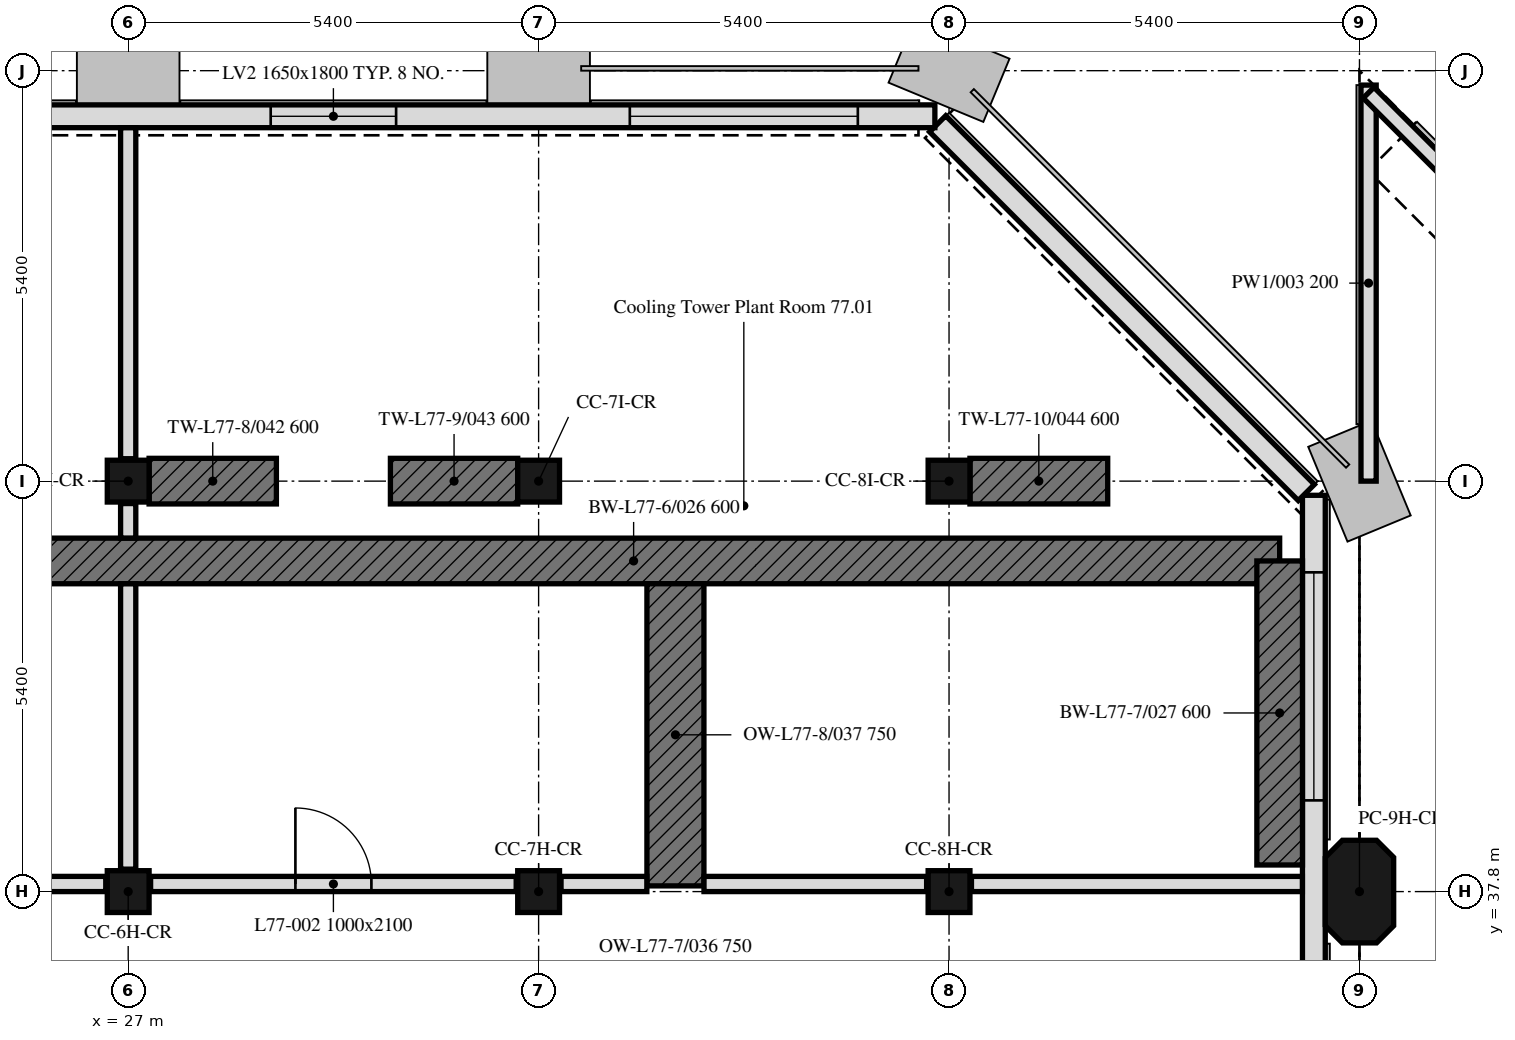
"""IFC4 building model, lengths in metres.
Left out: names, types, materials, properties, quantities, classifications, styles, units other than length and angle.
Written with IfcOpenShell. Run it as: python <this file> out.ifc"""

import sys

from ifc_helpers import new_model, si_unit, direction, frame, frame_2d, origin, origin_2d, place, context, subcontext, project, spatial, polyline, rectangle, outline, extrude, element, fill, save


model = new_model("IFC4")
c1 = context("Model", 3, precision=1e-05, world=origin(), true_north=direction((0.0, 1.0)))
c2 = subcontext(c1, "Body", "Model", "MODEL_VIEW")
j1 = project(units=[si_unit("LENGTHUNIT", "METRE"), si_unit("PLANEANGLEUNIT", "RADIAN")], contexts=[c1])
p1 = place(None, origin())
s1 = spatial("IfcSite", under=j1, at=p1, CompositionType="ELEMENT")
p2 = place(p1, origin())
s2 = spatial("IfcBuilding", under=s1, at=p2, CompositionType="ELEMENT")
p3 = place(p2, frame((0.0, 0.0, 308.2)))
s3 = spatial("IfcBuildingStorey", under=s2, at=p3, CompositionType="ELEMENT", Elevation=308.2)
for number, where, z_axis, x_axis in (
    (1, (27.0, 37.8, 0.0), (0.0, 0.0, 1.0), (1.0, 0.0, 0.0)),
    (2, (32.4, 37.8, 0.0), (0.0, 0.0, 1.0), (1.0, 0.0, 0.0)),
    (3, (37.8, 37.8, 0.0), (0.0, 0.0, 1.0), (1.0, 0.0, 0.0)),
):
    element("IfcColumn", number, at=place(p3, frame(where, z_axis=z_axis, x_axis=x_axis)), inside=s3, PredefinedType="COLUMN", context=c2, shape_type="SweptSolid", body=[
        extrude(rectangle(XDim=0.55, YDim=0.55, at=origin_2d()), origin(), (0.0, 0.0, 1.0), 4.2),
    ])
p4 = place(p3, frame((43.2, 37.8, 0.0), z_axis=(0.0, 0.0, 1.0), x_axis=(0.0, 1.0, 0.0)))
e4 = element("IfcColumn", 4, at=p4, inside=s3, PredefinedType="COLUMN", context=c2, shape_type="SweptSolid", body=[
    extrude(outline(polyline([(-0.45, -0.45), (0.45, -0.45), (0.675, -0.225), (0.675, 0.225), (0.45, 0.45), (-0.45, 0.45), (-0.675, 0.225), (-0.675, -0.225), (-0.45, -0.45)])), origin(), (0.0, 0.0, 1.0), 4.2),
])
for number, where, z_axis, x_axis in (
    (5, (27.0, 43.2, 0.0), (0.0, 0.0, 1.0), (1.0, 0.0, 0.0)),
    (6, (32.4, 43.2, 0.0), (0.0, 0.0, 1.0), (1.0, 0.0, 0.0)),
    (7, (37.8, 43.2, 0.0), (0.0, 0.0, 1.0), (1.0, 0.0, 0.0)),
):
    element("IfcColumn", number, at=place(p3, frame(where, z_axis=z_axis, x_axis=x_axis)), inside=s3, PredefinedType="COLUMN", context=c2, shape_type="SweptSolid", body=[
        extrude(rectangle(XDim=0.55, YDim=0.55, at=origin_2d()), origin(), (0.0, 0.0, 1.0), 4.2),
    ])
p5 = place(p3, frame((25.15, 42.15, 0.0), z_axis=(0.0, 0.0, 1.0), x_axis=(1.0, 0.0, 0.0)))
e8 = element("IfcWall", 8, at=p5, inside=s3, PredefinedType="SHEAR", context=c2, shape_type="SweptSolid", body=[
    extrude(rectangle(XDim=17.0, YDim=0.6, at=frame_2d((8.5, 0.0))), origin(), (0.0, 0.0, 1.0), 4.2),
])
p6 = place(p3, frame((42.15, 42.15, 0.0), z_axis=(0.0, 0.0, 1.0), x_axis=(0.0, -1.0, 0.0)))
e9 = element("IfcWall", 9, at=p6, inside=s3, PredefinedType="SHEAR", context=c2, shape_type="SweptSolid", body=[
    extrude(rectangle(XDim=4.0, YDim=0.6, at=frame_2d((2.0, 0.0))), origin(), (0.0, 0.0, 1.0), 4.2),
])
p7 = place(p3, frame((34.2, 37.875, 0.0), z_axis=(0.0, 0.0, 1.0), x_axis=(0.0, 1.0, 0.0)))
e10 = element("IfcWall", 10, at=p7, inside=s3, PredefinedType="SHEAR", context=c2, shape_type="SweptSolid", body=[
    extrude(rectangle(XDim=3.975, YDim=0.75, at=frame_2d((1.988, 0.0))), origin(), (0.0, 0.0, 1.0), 4.2),
])
for number, where, z_axis, x_axis in (
    (11, (27.275, 43.2, 0.0), (0.0, 0.0, 1.0), (1.0, 0.0, 0.0)),
    (12, (30.45, 43.2, 0.0), (0.0, 0.0, 1.0), (1.0, 0.0, 0.0)),
):
    element("IfcWall", number, at=place(p3, frame(where, z_axis=z_axis, x_axis=x_axis)), inside=s3, PredefinedType="SHEAR", context=c2, shape_type="SweptSolid", body=[
        extrude(rectangle(XDim=1.675, YDim=0.6, at=frame_2d((0.837, 0.0))), origin(), (0.0, 0.0, 1.0), 4.2),
    ])
p8 = place(p3, frame((38.075, 43.2, 0.0), z_axis=(0.0, 0.0, 1.0), x_axis=(1.0, 0.0, 0.0)))
e13 = element("IfcWall", 13, at=p8, inside=s3, PredefinedType="SHEAR", context=c2, shape_type="SweptSolid", body=[
    extrude(rectangle(XDim=1.812, YDim=0.6, at=frame_2d((0.906, 0.0))), origin(), (0.0, 0.0, 1.0), 4.2),
])
p9 = place(p3, frame((42.6, 32.4, 0.0), z_axis=(0.0, 0.0, 1.0), x_axis=(0.0, 1.0, 0.0)))
e14 = element("IfcWall", 14, at=p9, inside=s3, PredefinedType="SOLIDWALL", context=c2, shape_type="SweptSolid", body=[
    extrude(outline(polyline([(0.0, 0.0), (10.614, 0.0), (10.614, 4.2), (10.024, 4.2), (9.434, 4.2), (8.845, 4.2), (8.255, 4.2), (7.665, 4.2), (7.076, 4.2), (6.486, 4.2), (5.896, 4.2), (5.307, 4.2), (4.717, 4.2), (4.127, 4.2), (3.538, 4.2), (2.948, 4.2), (2.359, 4.2), (1.769, 4.2), (1.179, 4.2), (0.59, 4.2), (0.0, 4.2), (0.0, 0.0)])), frame((0.0, 0.15, 0.0), z_axis=(0.0, -1.0, 0.0), x_axis=(1.0, 0.0, 0.0)), (0.0, 0.0, 1.0), 0.3),
])
p10 = place(p9, frame((1.2, 0.0, 0.6)))
e15 = element("IfcOpeningElement", 15, at=p10, cuts=e14, PredefinedType="OPENING", context=c2, shape_type="SweptSolid", body=[
    extrude(rectangle(XDim=3.0, YDim=1.8, at=frame_2d((1.5, 0.9))), frame((0.0, 0.16, 0.0), z_axis=(0.0, -1.0, 0.0), x_axis=(1.0, 0.0, 0.0)), (0.0, 0.0, 1.0), 0.32),
])
p11 = place(p9, frame((6.6, 0.0, 0.6)))
e16 = element("IfcOpeningElement", 16, at=p11, cuts=e14, PredefinedType="OPENING", context=c2, shape_type="SweptSolid", body=[
    extrude(rectangle(XDim=3.0, YDim=1.8, at=frame_2d((1.5, 0.9))), frame((0.0, 0.16, 0.0), z_axis=(0.0, -1.0, 0.0), x_axis=(1.0, 0.0, 0.0)), (0.0, 0.0, 1.0), 0.32),
])
p12 = place(p3, frame((42.501, 43.051, 0.0), z_axis=(0.0, 0.0, 1.0), x_axis=(-0.707106781187, 0.707106781187, 0.0)))
e17 = element("IfcWall", 17, at=p12, inside=s3, PredefinedType="SOLIDWALL", context=c2, shape_type="SweptSolid", body=[
    extrude(outline(polyline([(0.0, 0.0), (6.86, 0.0), (6.86, 4.2), (6.288, 4.2), (5.716, 4.2), (5.145, 4.2), (4.573, 4.2), (4.001, 4.2), (3.43, 4.2), (2.858, 4.2), (2.287, 4.2), (1.715, 4.2), (1.143, 4.2), (0.572, 4.2), (0.0, 4.2), (0.0, 0.0)])), frame((0.0, 0.15, 0.0), z_axis=(0.0, -1.0, 0.0), x_axis=(1.0, 0.0, 0.0)), (0.0, 0.0, 1.0), 0.3),
])
p13 = place(p3, frame((37.614, 48.0, 0.0), z_axis=(0.0, 0.0, 1.0), x_axis=(-1.0, 0.0, 0.0)))
e18 = element("IfcWall", 18, at=p13, inside=s3, PredefinedType="SOLIDWALL", context=c2, shape_type="SweptSolid", body=[
    extrude(outline(polyline([(0.0, 0.0), (32.027, 0.0), (32.027, 4.2), (31.434, 4.2), (30.841, 4.2), (30.248, 4.2), (29.655, 4.2), (29.062, 4.2), (28.469, 4.2), (27.875, 4.2), (27.282, 4.2), (26.689, 4.2), (26.096, 4.2), (25.503, 4.2), (24.91, 4.2), (24.317, 4.2), (23.724, 4.2), (23.131, 4.2), (22.538, 4.2), (21.945, 4.2), (21.352, 4.2), (20.758, 4.2), (20.165, 4.2), (19.572, 4.2), (18.979, 4.2), (18.386, 4.2), (17.793, 4.2), (17.2, 4.2), (16.607, 4.2), (16.014, 4.2), (15.42, 4.2), (14.827, 4.2), (14.234, 4.2), (13.641, 4.2), (13.048, 4.2), (12.455, 4.2), (11.862, 4.2), (11.269, 4.2), (10.676, 4.2), (10.083, 4.2), (9.49, 4.2), (8.896, 4.2), (8.303, 4.2), (7.71, 4.2), (7.117, 4.2), (6.524, 4.2), (5.931, 4.2), (5.338, 4.2), (4.745, 4.2), (4.152, 4.2), (3.559, 4.2), (2.966, 4.2), (2.372, 4.2), (1.779, 4.2), (1.186, 4.2), (0.593, 4.2), (0.0, 4.2), (0.0, 0.0)])), frame((0.0, 0.15, 0.0), z_axis=(0.0, -1.0, 0.0), x_axis=(1.0, 0.0, 0.0)), (0.0, 0.0, 1.0), 0.3),
])
p14 = place(p13, frame((1.014, 0.0, 0.6)))
e19 = element("IfcOpeningElement", 19, at=p14, cuts=e18, PredefinedType="OPENING", context=c2, shape_type="SweptSolid", body=[
    extrude(rectangle(XDim=3.0, YDim=1.8, at=frame_2d((1.5, 0.9))), frame((0.0, 0.16, 0.0), z_axis=(0.0, -1.0, 0.0), x_axis=(1.0, 0.0, 0.0)), (0.0, 0.0, 1.0), 0.32),
])
p15 = place(p13, frame((7.089, 0.0, 0.6)))
e20 = element("IfcOpeningElement", 20, at=p15, cuts=e18, PredefinedType="OPENING", context=c2, shape_type="SweptSolid", body=[
    extrude(rectangle(XDim=1.65, YDim=1.8, at=frame_2d((0.825, 0.9))), frame((0.0, 0.16, 0.0), z_axis=(0.0, -1.0, 0.0), x_axis=(1.0, 0.0, 0.0)), (0.0, 0.0, 1.0), 0.32),
])
p16 = place(p13, frame((12.489, 0.0, 0.6)))
e21 = element("IfcOpeningElement", 21, at=p16, cuts=e18, PredefinedType="OPENING", context=c2, shape_type="SweptSolid", body=[
    extrude(rectangle(XDim=1.65, YDim=1.8, at=frame_2d((0.825, 0.9))), frame((0.0, 0.16, 0.0), z_axis=(0.0, -1.0, 0.0), x_axis=(1.0, 0.0, 0.0)), (0.0, 0.0, 1.0), 0.32),
])
p17 = place(p13, frame((17.889, 0.0, 0.6)))
e22 = element("IfcOpeningElement", 22, at=p17, cuts=e18, PredefinedType="OPENING", context=c2, shape_type="SweptSolid", body=[
    extrude(rectangle(XDim=1.65, YDim=1.8, at=frame_2d((0.825, 0.9))), frame((0.0, 0.16, 0.0), z_axis=(0.0, -1.0, 0.0), x_axis=(1.0, 0.0, 0.0)), (0.0, 0.0, 1.0), 0.32),
])
p18 = place(p13, frame((23.289, 0.0, 0.6)))
e23 = element("IfcOpeningElement", 23, at=p18, cuts=e18, PredefinedType="OPENING", context=c2, shape_type="SweptSolid", body=[
    extrude(rectangle(XDim=1.65, YDim=1.8, at=frame_2d((0.825, 0.9))), frame((0.0, 0.16, 0.0), z_axis=(0.0, -1.0, 0.0), x_axis=(1.0, 0.0, 0.0)), (0.0, 0.0, 1.0), 0.32),
])
p19 = place(p13, frame((28.014, 0.0, 0.6)))
e24 = element("IfcOpeningElement", 24, at=p19, cuts=e18, PredefinedType="OPENING", context=c2, shape_type="SweptSolid", body=[
    extrude(rectangle(XDim=3.0, YDim=1.8, at=frame_2d((1.5, 0.9))), frame((0.0, 0.16, 0.0), z_axis=(0.0, -1.0, 0.0), x_axis=(1.0, 0.0, 0.0)), (0.0, 0.0, 1.0), 0.32),
])
p20 = place(p3, frame((43.32, 43.2, 0.0), z_axis=(0.0, 0.0, 1.0), x_axis=(0.0, 1.0, 0.0)))
e25 = element("IfcWall", 25, at=p20, inside=s3, PredefinedType="PARAPET", context=c2, shape_type="SweptSolid", body=[
    extrude(rectangle(XDim=5.21, YDim=0.2, at=frame_2d((2.605, 0.0))), origin(), (0.0, 0.0, 1.0), 1.1),
])
p21 = place(p3, frame((43.32, 48.31, 0.0), z_axis=(0.0, 0.0, 1.0), x_axis=(0.707106781187, -0.707106781187, 0.0)))
e26 = element("IfcWall", 26, at=p21, inside=s3, PredefinedType="PARAPET", context=c2, shape_type="SweptSolid", body=[
    extrude(rectangle(XDim=7.397, YDim=0.2, at=frame_2d((3.699, 0.0))), origin(), (0.0, 0.0, 1.0), 1.1),
])
p22 = place(p3, frame((27.0, 47.849, 0.0), z_axis=(0.0, 0.0, 1.0), x_axis=(0.0, -1.0, 0.0)))
e27 = element("IfcWall", 27, at=p22, inside=s3, PredefinedType="PARTITIONING", context=c2, shape_type="SweptSolid", body=[
    extrude(rectangle(XDim=4.354, YDim=0.2, at=frame_2d((2.177, 0.0))), origin(), (0.0, 0.0, 1.0), 3.45),
])
p23 = place(p3, frame((27.0, 42.905, 0.0), z_axis=(0.0, 0.0, 1.0), x_axis=(0.0, -1.0, 0.0)))
e28 = element("IfcWall", 28, at=p23, inside=s3, PredefinedType="PARTITIONING", context=c2, shape_type="SweptSolid", body=[
    extrude(rectangle(XDim=0.454, YDim=0.2, at=frame_2d((0.227, 0.0))), origin(), (0.0, 0.0, 1.0), 3.45),
])
p24 = place(p3, frame((27.0, 41.849, 0.0), z_axis=(0.0, 0.0, 1.0), x_axis=(0.0, -1.0, 0.0)))
e29 = element("IfcWall", 29, at=p24, inside=s3, PredefinedType="PARTITIONING", context=c2, shape_type="SweptSolid", body=[
    extrude(rectangle(XDim=3.754, YDim=0.2, at=frame_2d((1.877, 0.0))), origin(), (0.0, 0.0, 1.0), 3.45),
])
p25 = place(p3, frame((27.295, 37.9, 0.0), z_axis=(0.0, 0.0, 1.0), x_axis=(1.0, 0.0, 0.0)))
e30 = element("IfcWall", 30, at=p25, inside=s3, PredefinedType="PARTITIONING", context=c2, shape_type="SweptSolid", body=[
    extrude(rectangle(XDim=4.81, YDim=0.2, at=frame_2d((2.405, 0.0))), origin(), (0.0, 0.0, 1.0), 4.2),
])
p26 = place(p25, frame((1.905, 0.0, 0.0)))
e31 = element("IfcOpeningElement", 31, at=p26, cuts=e30, PredefinedType="OPENING", context=c2, shape_type="SweptSolid", body=[
    extrude(rectangle(XDim=1.0, YDim=2.1, at=frame_2d((0.5, 1.05))), frame((0.0, 0.1, 0.0), z_axis=(0.0, -1.0, 0.0), x_axis=(1.0, 0.0, 0.0)), (0.0, 0.0, 1.0), 0.2),
])
p27 = place(p3, frame((32.695, 37.9, 0.0), z_axis=(0.0, 0.0, 1.0), x_axis=(1.0, 0.0, 0.0)))
e32 = element("IfcWall", 32, at=p27, inside=s3, PredefinedType="PARTITIONING", context=c2, shape_type="SweptSolid", body=[
    extrude(rectangle(XDim=1.129, YDim=0.2, at=frame_2d((0.564, 0.0))), origin(), (0.0, 0.0, 1.0), 4.2),
])
p28 = place(p3, frame((34.576, 37.9, 0.0), z_axis=(0.0, 0.0, 1.0), x_axis=(1.0, 0.0, 0.0)))
e33 = element("IfcWall", 33, at=p28, inside=s3, PredefinedType="PARTITIONING", context=c2, shape_type="SweptSolid", body=[
    extrude(rectangle(XDim=2.929, YDim=0.2, at=frame_2d((1.464, 0.0))), origin(), (0.0, 0.0, 1.0), 4.2),
])
p29 = place(p3, frame((38.095, 37.9, 0.0), z_axis=(0.0, 0.0, 1.0), x_axis=(1.0, 0.0, 0.0)))
e34 = element("IfcWall", 34, at=p29, inside=s3, PredefinedType="PARTITIONING", context=c2, shape_type="SweptSolid", body=[
    extrude(rectangle(XDim=4.354, YDim=0.2, at=frame_2d((2.177, 0.0))), origin(), (0.0, 0.0, 1.0), 4.2),
])
p30 = place(p3, frame((21.895, 37.9, 0.0), z_axis=(0.0, 0.0, 1.0), x_axis=(1.0, 0.0, 0.0)))
e35 = element("IfcWall", 35, at=p30, inside=s3, PredefinedType="PARTITIONING", context=c2, shape_type="SweptSolid", body=[
    extrude(rectangle(XDim=4.81, YDim=0.2, at=frame_2d((2.405, 0.0))), origin(), (0.0, 0.0, 1.0), 4.2),
])
p31 = place(p11, origin())
e36 = element("IfcWindow", 36, at=p31, inside=s3, PartitioningType="SINGLE_PANEL", PredefinedType="WINDOW", context=c2, shape_type="SweptSolid", body=[
    extrude(rectangle(XDim=3.0, YDim=1.8, at=frame_2d((1.5, 0.9))), frame((0.0, 0.03, 0.0), z_axis=(0.0, -1.0, 0.0), x_axis=(1.0, 0.0, 0.0)), (0.0, 0.0, 1.0), 0.06),
])
fill(e16, e36)
p32 = place(p14, origin())
e37 = element("IfcWindow", 37, at=p32, inside=s3, PartitioningType="SINGLE_PANEL", PredefinedType="WINDOW", context=c2, shape_type="SweptSolid", body=[
    extrude(rectangle(XDim=3.0, YDim=1.8, at=frame_2d((1.5, 0.9))), frame((0.0, 0.03, 0.0), z_axis=(0.0, -1.0, 0.0), x_axis=(1.0, 0.0, 0.0)), (0.0, 0.0, 1.0), 0.06),
])
fill(e19, e37)
p33 = place(p15, origin())
e38 = element("IfcWindow", 38, at=p33, inside=s3, PartitioningType="SINGLE_PANEL", PredefinedType="WINDOW", context=c2, shape_type="SweptSolid", body=[
    extrude(rectangle(XDim=1.65, YDim=1.8, at=frame_2d((0.825, 0.9))), frame((0.0, 0.03, 0.0), z_axis=(0.0, -1.0, 0.0), x_axis=(1.0, 0.0, 0.0)), (0.0, 0.0, 1.0), 0.06),
])
fill(e20, e38)
p34 = place(p26, origin())
e39 = element("IfcDoor", 39, at=p34, inside=s3, OperationType="SINGLE_SWING_RIGHT", PredefinedType="DOOR", context=c2, shape_type="SweptSolid", body=[
    extrude(rectangle(XDim=1.0, YDim=2.1, at=frame_2d((0.5, 1.05))), frame((0.0, 0.025, 0.0), z_axis=(0.0, -1.0, 0.0), x_axis=(1.0, 0.0, 0.0)), (0.0, 0.0, 1.0), 0.05),
])
fill(e31, e39)
save(model, sys.argv[1])
